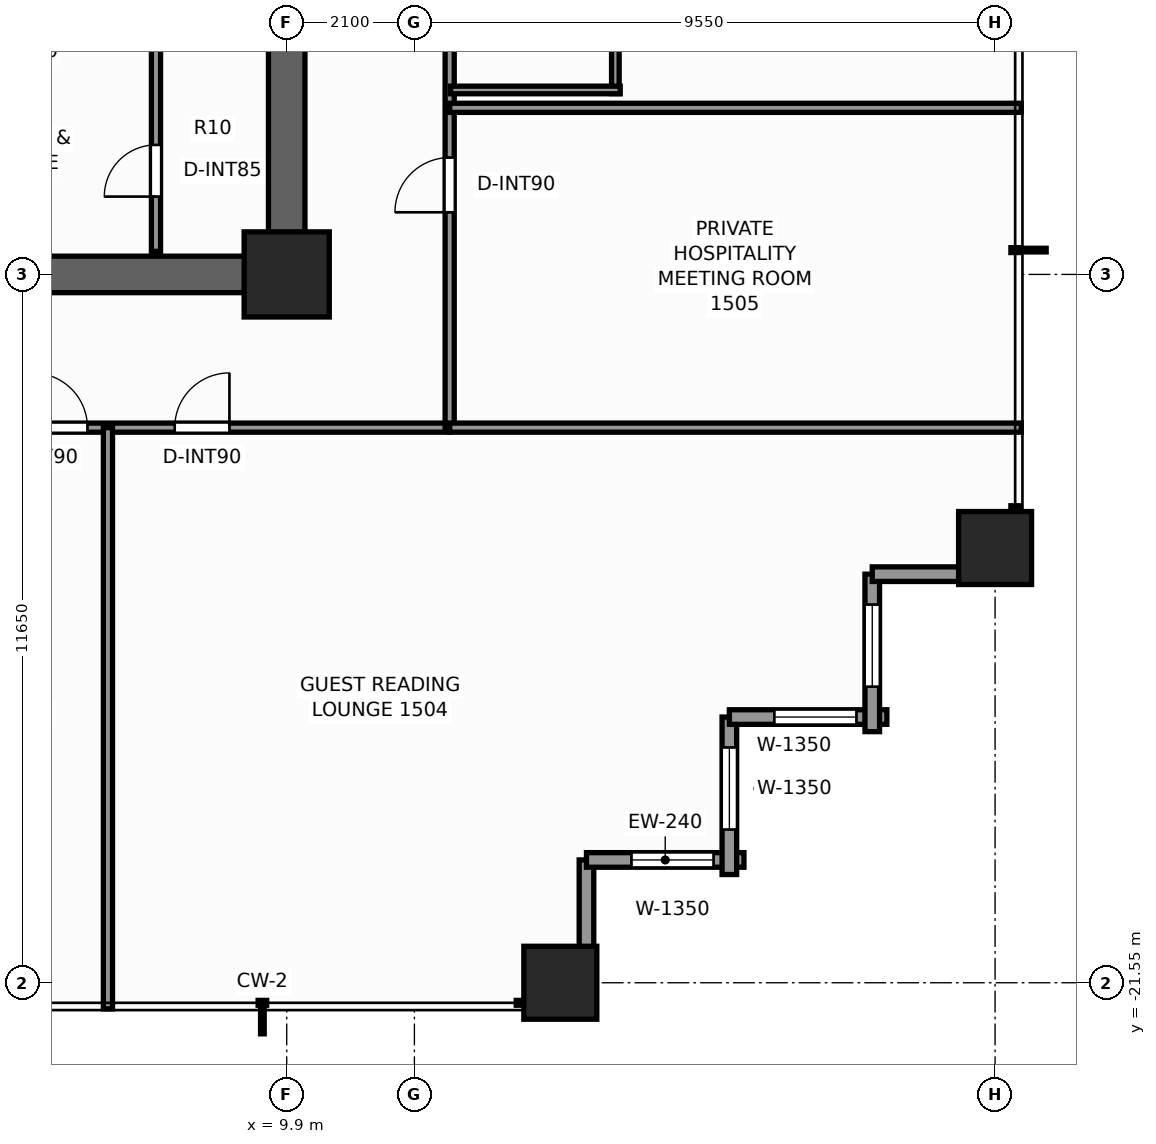
"""IFC4 building model, lengths in metres.
Left out: names, types, materials, properties, quantities, classifications, styles, units other than length and angle.
Written with IfcOpenShell. Run it as: python <this file> out.ifc"""

import sys

from ifc_helpers import new_model, si_unit, direction, frame, frame_2d, origin, origin_2d, place, context, subcontext, project, spatial, rectangle, extrude, element, fill, save


model = new_model("IFC4")
c1 = context("Model", 3, precision=1e-05, world=origin(), true_north=direction((0.0, 1.0)))
c2 = subcontext(c1, "Body", "Model", "MODEL_VIEW")
j1 = project(units=[si_unit("LENGTHUNIT", "METRE"), si_unit("PLANEANGLEUNIT", "RADIAN")], contexts=[c1])
p1 = place(None, origin())
s1 = spatial("IfcSite", under=j1, at=p1, CompositionType="ELEMENT")
p2 = place(p1, origin())
s2 = spatial("IfcBuilding", under=s1, at=p2, CompositionType="ELEMENT")
p3 = place(p2, frame((0.0, 0.0, 53.5)))
s3 = spatial("IfcBuildingStorey", under=s2, at=p3, CompositionType="ELEMENT", Elevation=53.5)
p4 = place(p3, frame((10.2, -9.9, 0.0), z_axis=(0.0, 0.0, 1.0), x_axis=(-1.0, 0.0, 0.0)))
e1 = element("IfcWall", 1, at=p4, inside=s3, PredefinedType="SHEAR", context=c2, shape_type="SweptSolid", body=[
    extrude(rectangle(XDim=12.06, YDim=0.6, at=frame_2d((6.03, 0.0))), origin(), (0.0, 0.0, 1.0), 3.3),
])
p5 = place(p3, frame((9.9, -9.6, 0.0), z_axis=(0.0, 0.0, 1.0), x_axis=(0.0, 1.0, 0.0)))
e2 = element("IfcWall", 2, at=p5, inside=s3, PredefinedType="SHEAR", context=c2, shape_type="SweptSolid", body=[
    extrude(rectangle(XDim=4.05, YDim=0.6, at=frame_2d((2.025, 0.0))), origin(), (0.0, 0.0, 1.0), 3.3),
])
p6 = place(p3, frame((9.9, -9.9, 0.0), z_axis=(0.0, 0.0, 1.0), x_axis=(1.0, 0.0, 0.0)))
e3 = element("IfcColumn", 3, at=p6, inside=s3, PredefinedType="COLUMN", context=c2, shape_type="SweptSolid", body=[
    extrude(rectangle(XDim=1.4, YDim=1.4, at=origin_2d()), origin(), (0.0, 0.0, 1.0), 3.3),
])
for number, where, z_axis, x_axis in (
    (4, (14.4, -21.55, 0.0), (0.0, 0.0, 1.0), (1.0, 0.0, 0.0)),
    (5, (21.55, -14.4, 0.0), (0.0, 0.0, 1.0), (1.0, 0.0, 0.0)),
):
    element("IfcColumn", number, at=place(p3, frame(where, z_axis=z_axis, x_axis=x_axis)), inside=s3, PredefinedType="COLUMN", context=c2, shape_type="SweptSolid", body=[
        extrude(rectangle(XDim=1.2, YDim=1.2, at=origin_2d()), origin(), (0.0, 0.0, 1.0), 3.3),
    ])
p7 = place(p3, frame((14.83, -19.53, 0.0), z_axis=(0.0, 0.0, 1.0), x_axis=(0.0, -1.0, 0.0)))
e6 = element("IfcWall", 6, at=p7, inside=s3, PredefinedType="STANDARD", context=c2, shape_type="SweptSolid", body=[
    extrude(rectangle(XDim=2.59, YDim=0.24, at=frame_2d((1.295, 0.0))), origin(), (0.0, 0.0, 1.0), 2.439),
])
p8 = place(p3, frame((17.42, -19.53, 0.0), z_axis=(0.0, 0.0, 1.0), x_axis=(-1.0, 0.0, 0.0)))
e7 = element("IfcWall", 7, at=p8, inside=s3, PredefinedType="STANDARD", context=c2, shape_type="SweptSolid", body=[
    extrude(rectangle(XDim=2.59, YDim=0.24, at=frame_2d((1.295, 0.0))), origin(), (0.0, 0.0, 1.0), 2.439),
])
p9 = place(p8, frame((0.5, 0.0, 0.65)))
e8 = element("IfcOpeningElement", 8, at=p9, cuts=e7, PredefinedType="OPENING", context=c2, shape_type="SweptSolid", body=[
    extrude(rectangle(XDim=1.35, YDim=1.55, at=frame_2d((0.675, 0.775))), frame((0.0, 0.13, 0.0), z_axis=(0.0, -1.0, 0.0), x_axis=(1.0, 0.0, 0.0)), (0.0, 0.0, 1.0), 0.26),
])
p10 = place(p3, frame((17.18, -17.18, 0.0), z_axis=(0.0, 0.0, 1.0), x_axis=(0.0, -1.0, 0.0)))
e9 = element("IfcWall", 9, at=p10, inside=s3, PredefinedType="STANDARD", context=c2, shape_type="SweptSolid", body=[
    extrude(rectangle(XDim=2.59, YDim=0.24, at=frame_2d((1.295, 0.0))), origin(), (0.0, 0.0, 1.0), 2.439),
])
p11 = place(p10, frame((0.5, 0.0, 0.65)))
e10 = element("IfcOpeningElement", 10, at=p11, cuts=e9, PredefinedType="OPENING", context=c2, shape_type="SweptSolid", body=[
    extrude(rectangle(XDim=1.35, YDim=1.55, at=frame_2d((0.675, 0.775))), frame((0.0, 0.13, 0.0), z_axis=(0.0, -1.0, 0.0), x_axis=(1.0, 0.0, 0.0)), (0.0, 0.0, 1.0), 0.26),
])
p12 = place(p3, frame((19.77, -17.18, 0.0), z_axis=(0.0, 0.0, 1.0), x_axis=(-1.0, 0.0, 0.0)))
e11 = element("IfcWall", 11, at=p12, inside=s3, PredefinedType="STANDARD", context=c2, shape_type="SweptSolid", body=[
    extrude(rectangle(XDim=2.59, YDim=0.24, at=frame_2d((1.295, 0.0))), origin(), (0.0, 0.0, 1.0), 2.439),
])
p13 = place(p12, frame((0.5, 0.0, 0.65)))
e12 = element("IfcOpeningElement", 12, at=p13, cuts=e11, PredefinedType="OPENING", context=c2, shape_type="SweptSolid", body=[
    extrude(rectangle(XDim=1.35, YDim=1.55, at=frame_2d((0.675, 0.775))), frame((0.0, 0.13, 0.0), z_axis=(0.0, -1.0, 0.0), x_axis=(1.0, 0.0, 0.0)), (0.0, 0.0, 1.0), 0.26),
])
p14 = place(p3, frame((19.53, -14.83, 0.0), z_axis=(0.0, 0.0, 1.0), x_axis=(0.0, -1.0, 0.0)))
e13 = element("IfcWall", 13, at=p14, inside=s3, PredefinedType="STANDARD", context=c2, shape_type="SweptSolid", body=[
    extrude(rectangle(XDim=2.59, YDim=0.24, at=frame_2d((1.295, 0.0))), origin(), (0.0, 0.0, 1.0), 2.439),
])
p15 = place(p14, frame((0.5, 0.0, 0.65)))
e14 = element("IfcOpeningElement", 14, at=p15, cuts=e13, PredefinedType="OPENING", context=c2, shape_type="SweptSolid", body=[
    extrude(rectangle(XDim=1.35, YDim=1.55, at=frame_2d((0.675, 0.775))), frame((0.0, 0.13, 0.0), z_axis=(0.0, -1.0, 0.0), x_axis=(1.0, 0.0, 0.0)), (0.0, 0.0, 1.0), 0.26),
])
p16 = place(p3, frame((22.12, -14.83, 0.0), z_axis=(0.0, 0.0, 1.0), x_axis=(-1.0, 0.0, 0.0)))
e15 = element("IfcWall", 15, at=p16, inside=s3, PredefinedType="STANDARD", context=c2, shape_type="SweptSolid", body=[
    extrude(rectangle(XDim=2.59, YDim=0.24, at=frame_2d((1.295, 0.0))), origin(), (0.0, 0.0, 1.0), 2.439),
])
p17 = place(p3, frame((7.75, -9.52, 0.0), z_axis=(0.0, 0.0, 1.0), x_axis=(0.0, 1.0, 0.0)))
e16 = element("IfcWall", 16, at=p17, inside=s3, PredefinedType="PARTITIONING", context=c2, shape_type="SweptSolid", body=[
    extrude(rectangle(XDim=3.8, YDim=0.15, at=frame_2d((1.9, 0.0))), origin(), (0.0, 0.0, 1.0), 3.06),
])
p18 = place(p17, frame((0.9, 0.0, 0.0)))
e17 = element("IfcOpeningElement", 17, at=p18, cuts=e16, PredefinedType="OPENING", context=c2, shape_type="SweptSolid", body=[
    extrude(rectangle(XDim=0.85, YDim=2.03, at=frame_2d((0.425, 1.015))), frame((0.0, 0.085, 0.0), z_axis=(0.0, -1.0, 0.0), x_axis=(1.0, 0.0, 0.0)), (0.0, 0.0, 1.0), 0.17),
])
p19 = place(p3, frame((-12.26, -12.42, 0.0), z_axis=(0.0, 0.0, 1.0), x_axis=(1.0, 0.0, 0.0)))
e18 = element("IfcWall", 18, at=p19, inside=s3, PredefinedType="PARTITIONING", context=c2, shape_type="SweptSolid", body=[
    extrude(rectangle(XDim=24.84, YDim=0.15, at=frame_2d((12.42, 0.0))), origin(), (0.0, 0.0, 1.0), 2.272),
])
p20 = place(p19, frame((2.944, 0.0, 0.0)))
e19 = element("IfcOpeningElement", 19, at=p20, cuts=e18, PredefinedType="OPENING", context=c2, shape_type="SweptSolid", body=[
    extrude(rectangle(XDim=0.9, YDim=2.06, at=frame_2d((0.45, 1.03))), frame((0.0, 0.085, 0.0), z_axis=(0.0, -1.0, 0.0), x_axis=(1.0, 0.0, 0.0)), (0.0, 0.0, 1.0), 0.17),
])
p21 = place(p19, frame((5.279, 0.0, 0.0)))
e20 = element("IfcOpeningElement", 20, at=p21, cuts=e18, PredefinedType="OPENING", context=c2, shape_type="SweptSolid", body=[
    extrude(rectangle(XDim=0.9, YDim=2.06, at=frame_2d((0.45, 1.03))), frame((0.0, 0.085, 0.0), z_axis=(0.0, -1.0, 0.0), x_axis=(1.0, 0.0, 0.0)), (0.0, 0.0, 1.0), 0.17),
])
p22 = place(p19, frame((10.12, 0.0, 0.0)))
e21 = element("IfcOpeningElement", 21, at=p22, cuts=e18, PredefinedType="OPENING", context=c2, shape_type="SweptSolid", body=[
    extrude(rectangle(XDim=0.9, YDim=2.06, at=frame_2d((0.45, 1.03))), frame((0.0, 0.085, 0.0), z_axis=(0.0, -1.0, 0.0), x_axis=(1.0, 0.0, 0.0)), (0.0, 0.0, 1.0), 0.17),
])
p23 = place(p19, frame((13.228, 0.0, 0.0)))
e22 = element("IfcOpeningElement", 22, at=p23, cuts=e18, PredefinedType="OPENING", context=c2, shape_type="SweptSolid", body=[
    extrude(rectangle(XDim=0.95, YDim=2.06, at=frame_2d((0.475, 1.03))), frame((0.0, 0.085, 0.0), z_axis=(0.0, -1.0, 0.0), x_axis=(1.0, 0.0, 0.0)), (0.0, 0.0, 1.0), 0.17),
])
p24 = place(p19, frame((17.983, 0.0, 0.0)))
e23 = element("IfcOpeningElement", 23, at=p24, cuts=e18, PredefinedType="OPENING", context=c2, shape_type="SweptSolid", body=[
    extrude(rectangle(XDim=0.9, YDim=2.06, at=frame_2d((0.45, 1.03))), frame((0.0, 0.085, 0.0), z_axis=(0.0, -1.0, 0.0), x_axis=(1.0, 0.0, 0.0)), (0.0, 0.0, 1.0), 0.17),
])
p25 = place(p19, frame((20.318, 0.0, 0.0)))
e24 = element("IfcOpeningElement", 24, at=p25, cuts=e18, PredefinedType="OPENING", context=c2, shape_type="SweptSolid", body=[
    extrude(rectangle(XDim=0.9, YDim=2.06, at=frame_2d((0.45, 1.03))), frame((0.0, 0.085, 0.0), z_axis=(0.0, -1.0, 0.0), x_axis=(1.0, 0.0, 0.0)), (0.0, 0.0, 1.0), 0.17),
])
p26 = place(p3, frame((12.58, -12.42, 0.0), z_axis=(0.0, 0.0, 1.0), x_axis=(0.0, 1.0, 0.0)))
e25 = element("IfcWall", 25, at=p26, inside=s3, PredefinedType="PARTITIONING", context=c2, shape_type="SweptSolid", body=[
    extrude(rectangle(XDim=24.84, YDim=0.15, at=frame_2d((12.42, 0.0))), origin(), (0.0, 0.0, 1.0), 2.272),
])
p27 = place(p26, frame((3.542, 0.0, 0.0)))
e26 = element("IfcOpeningElement", 26, at=p27, cuts=e25, PredefinedType="OPENING", context=c2, shape_type="SweptSolid", body=[
    extrude(rectangle(XDim=0.9, YDim=2.06, at=frame_2d((0.45, 1.03))), frame((0.0, 0.085, 0.0), z_axis=(0.0, -1.0, 0.0), x_axis=(1.0, 0.0, 0.0)), (0.0, 0.0, 1.0), 0.17),
])
p28 = place(p26, frame((9.915, 0.0, 0.0)))
e27 = element("IfcOpeningElement", 27, at=p28, cuts=e25, PredefinedType="OPENING", context=c2, shape_type="SweptSolid", body=[
    extrude(rectangle(XDim=0.95, YDim=2.06, at=frame_2d((0.475, 1.03))), frame((0.0, 0.085, 0.0), z_axis=(0.0, -1.0, 0.0), x_axis=(1.0, 0.0, 0.0)), (0.0, 0.0, 1.0), 0.17),
])
p29 = place(p26, frame((19.505, 0.0, 0.0)))
e28 = element("IfcOpeningElement", 28, at=p29, cuts=e25, PredefinedType="OPENING", context=c2, shape_type="SweptSolid", body=[
    extrude(rectangle(XDim=0.9, YDim=2.06, at=frame_2d((0.45, 1.03))), frame((0.0, 0.085, 0.0), z_axis=(0.0, -1.0, 0.0), x_axis=(1.0, 0.0, 0.0)), (0.0, 0.0, 1.0), 0.17),
])
p30 = place(p3, frame((12.58, -12.42, 0.0), z_axis=(0.0, 0.0, 1.0), x_axis=(1.0, 0.0, 0.0)))
e29 = element("IfcWall", 29, at=p30, inside=s3, PredefinedType="PARTITIONING", context=c2, shape_type="SweptSolid", body=[
    extrude(rectangle(XDim=9.4, YDim=0.15, at=frame_2d((4.7, 0.0))), origin(), (0.0, 0.0, 1.0), 2.272),
])
p31 = place(p3, frame((6.96, -21.98, 0.0), z_axis=(0.0, 0.0, 1.0), x_axis=(0.0, 1.0, 0.0)))
e30 = element("IfcWall", 30, at=p31, inside=s3, PredefinedType="PARTITIONING", context=c2, shape_type="SweptSolid", body=[
    extrude(rectangle(XDim=9.56, YDim=0.15, at=frame_2d((4.78, 0.0))), origin(), (0.0, 0.0, 1.0), 2.429),
])
p32 = place(p3, frame((12.58, -7.16, 0.0), z_axis=(0.0, 0.0, 1.0), x_axis=(1.0, 0.0, 0.0)))
e31 = element("IfcWall", 31, at=p32, inside=s3, PredefinedType="PARTITIONING", context=c2, shape_type="SweptSolid", body=[
    extrude(rectangle(XDim=9.4, YDim=0.15, at=frame_2d((4.7, 0.0))), origin(), (0.0, 0.0, 1.0), 2.429),
])
p33 = place(p3, frame((15.305, -6.926, 0.0), z_axis=(0.0, 0.0, 1.0), x_axis=(0.0, 1.0, 0.0)))
e32 = element("IfcWall", 32, at=p33, inside=s3, PredefinedType="PARTITIONING", context=c2, shape_type="SweptSolid", body=[
    extrude(rectangle(XDim=2.37, YDim=0.125, at=frame_2d((1.185, 0.0))), origin(), (0.0, 0.0, 1.0), 2.272),
])
p34 = place(p3, frame((12.595, -6.866, 0.0), z_axis=(0.0, 0.0, 1.0), x_axis=(1.0, 0.0, 0.0)))
e33 = element("IfcWall", 33, at=p34, inside=s3, PredefinedType="PARTITIONING", context=c2, shape_type="SweptSolid", body=[
    extrude(rectangle(XDim=2.79, YDim=0.125, at=frame_2d((1.395, 0.0))), origin(), (0.0, 0.0, 1.0), 3.06),
])
p35 = place(p9, origin())
e34 = element("IfcWindow", 34, at=p35, inside=s3, PartitioningType="SINGLE_PANEL", PredefinedType="WINDOW", context=c2, shape_type="SweptSolid", body=[
    extrude(rectangle(XDim=1.35, YDim=1.55, at=frame_2d((0.675, 0.775))), frame((0.0, 0.03, 0.0), z_axis=(0.0, -1.0, 0.0), x_axis=(1.0, 0.0, 0.0)), (0.0, 0.0, 1.0), 0.06),
])
fill(e8, e34)
p36 = place(p11, origin())
e35 = element("IfcWindow", 35, at=p36, inside=s3, PartitioningType="SINGLE_PANEL", PredefinedType="WINDOW", context=c2, shape_type="SweptSolid", body=[
    extrude(rectangle(XDim=1.35, YDim=1.55, at=frame_2d((0.675, 0.775))), frame((0.0, 0.03, 0.0), z_axis=(0.0, -1.0, 0.0), x_axis=(1.0, 0.0, 0.0)), (0.0, 0.0, 1.0), 0.06),
])
fill(e10, e35)
p37 = place(p13, origin())
e36 = element("IfcWindow", 36, at=p37, inside=s3, PartitioningType="SINGLE_PANEL", PredefinedType="WINDOW", context=c2, shape_type="SweptSolid", body=[
    extrude(rectangle(XDim=1.35, YDim=1.55, at=frame_2d((0.675, 0.775))), frame((0.0, 0.03, 0.0), z_axis=(0.0, -1.0, 0.0), x_axis=(1.0, 0.0, 0.0)), (0.0, 0.0, 1.0), 0.06),
])
fill(e12, e36)
p38 = place(p15, origin())
e37 = element("IfcWindow", 37, at=p38, inside=s3, PartitioningType="SINGLE_PANEL", PredefinedType="WINDOW", context=c2, shape_type="SweptSolid", body=[
    extrude(rectangle(XDim=1.35, YDim=1.55, at=frame_2d((0.675, 0.775))), frame((0.0, 0.03, 0.0), z_axis=(0.0, -1.0, 0.0), x_axis=(1.0, 0.0, 0.0)), (0.0, 0.0, 1.0), 0.06),
])
fill(e14, e37)
p39 = place(p18, origin())
e38 = element("IfcDoor", 38, at=p39, inside=s3, OperationType="SINGLE_SWING_LEFT", PredefinedType="DOOR", context=c2, shape_type="SweptSolid", body=[
    extrude(rectangle(XDim=0.85, YDim=2.03, at=frame_2d((0.425, 1.015))), frame((0.0, 0.025, 0.0), z_axis=(0.0, -1.0, 0.0), x_axis=(1.0, 0.0, 0.0)), (0.0, 0.0, 1.0), 0.05),
])
fill(e17, e38)
p40 = place(p24, origin())
e39 = element("IfcDoor", 39, at=p40, inside=s3, OperationType="SINGLE_SWING_LEFT", PredefinedType="DOOR", context=c2, shape_type="SweptSolid", body=[
    extrude(rectangle(XDim=0.9, YDim=2.06, at=frame_2d((0.45, 1.03))), frame((0.0, 0.025, 0.0), z_axis=(0.0, -1.0, 0.0), x_axis=(1.0, 0.0, 0.0)), (0.0, 0.0, 1.0), 0.05),
])
fill(e23, e39)
p41 = place(p25, origin())
e40 = element("IfcDoor", 40, at=p41, inside=s3, OperationType="SINGLE_SWING_RIGHT", PredefinedType="DOOR", context=c2, shape_type="SweptSolid", body=[
    extrude(rectangle(XDim=0.9, YDim=2.06, at=frame_2d((0.45, 1.03))), frame((0.0, 0.025, 0.0), z_axis=(0.0, -1.0, 0.0), x_axis=(1.0, 0.0, 0.0)), (0.0, 0.0, 1.0), 0.05),
])
fill(e24, e40)
p42 = place(p27, origin())
e41 = element("IfcDoor", 41, at=p42, inside=s3, OperationType="SINGLE_SWING_LEFT", PredefinedType="DOOR", context=c2, shape_type="SweptSolid", body=[
    extrude(rectangle(XDim=0.9, YDim=2.06, at=frame_2d((0.45, 1.03))), frame((0.0, 0.025, 0.0), z_axis=(0.0, -1.0, 0.0), x_axis=(1.0, 0.0, 0.0)), (0.0, 0.0, 1.0), 0.05),
])
fill(e26, e41)
save(model, sys.argv[1])
